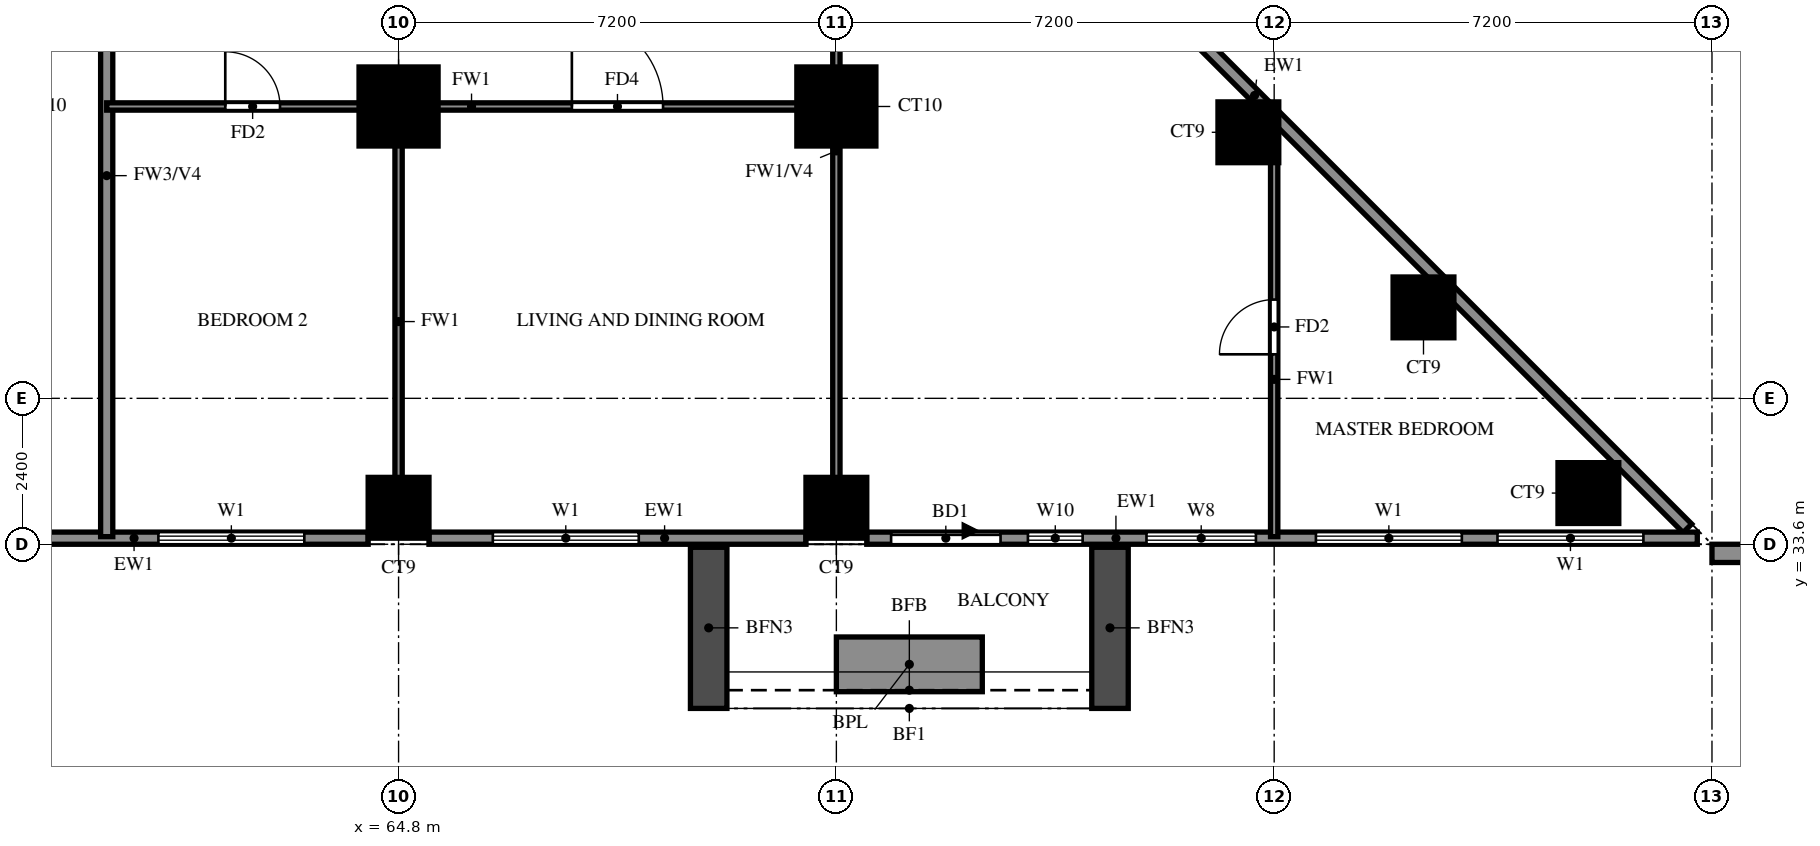
"""IFC4 building model, lengths in metres.
Left out: names, types, materials, properties, quantities, classifications, styles, units other than length and angle.
Written with IfcOpenShell. Run it as: python <this file> out.ifc"""

import sys

from ifc_helpers import new_model, si_unit, direction, frame, frame_2d, origin, origin_2d, place, context, subcontext, project, spatial, rectangle, extrude, source, transform, mapped, element, fill, save


model = new_model("IFC4")
c1 = context("Model", 3, precision=1e-05, world=origin(), true_north=direction((0.0, 1.0)))
c2 = subcontext(c1, "Body", "Model", "MODEL_VIEW")
j1 = project(units=[si_unit("LENGTHUNIT", "METRE"), si_unit("PLANEANGLEUNIT", "RADIAN")], contexts=[c1])
p1 = place(None, origin())
s1 = spatial("IfcSite", under=j1, at=p1, CompositionType="ELEMENT")
p2 = place(p1, origin())
s2 = spatial("IfcBuilding", under=s1, at=p2, CompositionType="ELEMENT")
p3 = place(p2, frame((0.0, 0.0, 86.5)))
s3 = spatial("IfcBuildingStorey", under=s2, at=p3, CompositionType="ELEMENT", Elevation=86.5)
m1 = source(origin(), c2, "Body", "SweptSolid", [
    extrude(rectangle(XDim=1.0, YDim=1.0, at=origin_2d()), origin(), (0.0, 0.0, 1.0), 3.18),
])
for number, where, z_axis, x_axis in (
    (1, (64.8, 34.2, 0.0), (0.0, 0.0, 1.0), (1.0, 0.0, 0.0)),
    (2, (72.0, 34.2, 0.0), (0.0, 0.0, 1.0), (1.0, 0.0, 0.0)),
    (3, (84.367, 34.442, 0.0), (0.0, 0.0, 1.0), (1.0, 0.0, 0.0)),
    (4, (81.656, 37.496, 0.0), (0.0, 0.0, 1.0), (1.0, 0.0, 0.0)),
    (5, (78.776, 40.376, 0.0), (0.0, 0.0, 1.0), (1.0, 0.0, 0.0)),
):
    element("IfcColumn", number, at=place(p3, frame(where, z_axis=z_axis, x_axis=x_axis)), inside=s3, PredefinedType="COLUMN", context=c2, shape_type="MappedRepresentation", body=[
        mapped(m1, transform((0.0, 0.0, 0.0))),
    ])
m2 = source(origin(), c2, "Body", "SweptSolid", [
    extrude(rectangle(XDim=1.3, YDim=1.3, at=origin_2d()), origin(), (0.0, 0.0, 1.0), 3.18),
])
for number, where, z_axis, x_axis in (
    (6, (64.8, 40.8, 0.0), (0.0, 0.0, 1.0), (1.0, 0.0, 0.0)),
    (7, (72.0, 40.8, 0.0), (0.0, 0.0, 1.0), (1.0, 0.0, 0.0)),
):
    element("IfcColumn", number, at=place(p3, frame(where, z_axis=z_axis, x_axis=x_axis)), inside=s3, PredefinedType="COLUMN", context=c2, shape_type="MappedRepresentation", body=[
        mapped(m2, transform((0.0, 0.0, 0.0))),
    ])
p4 = place(p3, frame((85.996, 33.863, 0.0), z_axis=(0.0, 0.0, 1.0), x_axis=(-0.707100718496, 0.707112843825, 0.0)))
e8 = element("IfcWall", 8, at=p4, inside=s3, PredefinedType="SOLIDWALL", context=c2, shape_type="SweptSolid", body=[
    extrude(rectangle(XDim=20.135, YDim=0.2, at=frame_2d((10.067, 0.0))), origin(), (0.0, 0.0, 1.0), 3.18),
])
p5 = place(p3, frame((58.8, 33.7, 0.0), z_axis=(0.0, 0.0, 1.0), x_axis=(1.0, 0.0, 0.0)))
e9 = element("IfcWall", 9, at=p5, inside=s3, PredefinedType="SOLIDWALL", context=c2, shape_type="SweptSolid", body=[
    extrude(rectangle(XDim=5.5, YDim=0.2, at=frame_2d((2.75, 0.0))), origin(), (0.0, 0.0, 1.0), 3.18),
])
p6 = place(p5, frame((2.05, 0.0, 0.6)))
e10 = element("IfcOpeningElement", 10, at=p6, cuts=e9, PredefinedType="OPENING", context=c2, shape_type="SweptSolid", body=[
    extrude(rectangle(XDim=2.4, YDim=2.4, at=frame_2d((1.2, 1.2))), frame((0.0, 0.11, 0.0), z_axis=(0.0, -1.0, 0.0), x_axis=(1.0, 0.0, 0.0)), (0.0, 0.0, 1.0), 0.22),
])
p7 = place(p3, frame((65.3, 33.7, 0.0), z_axis=(0.0, 0.0, 1.0), x_axis=(1.0, 0.0, 0.0)))
e11 = element("IfcWall", 11, at=p7, inside=s3, PredefinedType="SOLIDWALL", context=c2, shape_type="SweptSolid", body=[
    extrude(rectangle(XDim=6.2, YDim=0.2, at=frame_2d((3.1, 0.0))), origin(), (0.0, 0.0, 1.0), 3.18),
])
p8 = place(p7, frame((1.05, 0.0, 0.6)))
e12 = element("IfcOpeningElement", 12, at=p8, cuts=e11, PredefinedType="OPENING", context=c2, shape_type="SweptSolid", body=[
    extrude(rectangle(XDim=2.4, YDim=2.4, at=frame_2d((1.2, 1.2))), frame((0.0, 0.11, 0.0), z_axis=(0.0, -1.0, 0.0), x_axis=(1.0, 0.0, 0.0)), (0.0, 0.0, 1.0), 0.22),
])
p9 = place(p3, frame((72.5, 33.7, 0.0), z_axis=(0.0, 0.0, 1.0), x_axis=(1.0, 0.0, 0.0)))
e13 = element("IfcWall", 13, at=p9, inside=s3, PredefinedType="SOLIDWALL", context=c2, shape_type="SweptSolid", body=[
    extrude(rectangle(XDim=13.659, YDim=0.2, at=frame_2d((6.829, 0.0))), origin(), (0.0, 0.0, 1.0), 3.18),
])
p10 = place(p9, frame((0.4, 0.0, 0.0)))
e14 = element("IfcOpeningElement", 14, at=p10, cuts=e13, PredefinedType="OPENING", context=c2, shape_type="SweptSolid", body=[
    extrude(rectangle(XDim=1.8, YDim=2.4, at=frame_2d((0.9, 1.2))), frame((0.0, 0.11, 0.0), z_axis=(0.0, -1.0, 0.0), x_axis=(1.0, 0.0, 0.0)), (0.0, 0.0, 1.0), 0.22),
])
p11 = place(p9, frame((2.65, 0.0, 0.6)))
e15 = element("IfcOpeningElement", 15, at=p11, cuts=e13, PredefinedType="OPENING", context=c2, shape_type="SweptSolid", body=[
    extrude(rectangle(XDim=0.9, YDim=2.4, at=frame_2d((0.45, 1.2))), frame((0.0, 0.11, 0.0), z_axis=(0.0, -1.0, 0.0), x_axis=(1.0, 0.0, 0.0)), (0.0, 0.0, 1.0), 0.22),
])
p12 = place(p9, frame((4.6, 0.0, 0.6)))
e16 = element("IfcOpeningElement", 16, at=p12, cuts=e13, PredefinedType="OPENING", context=c2, shape_type="SweptSolid", body=[
    extrude(rectangle(XDim=1.8, YDim=2.4, at=frame_2d((0.9, 1.2))), frame((0.0, 0.11, 0.0), z_axis=(0.0, -1.0, 0.0), x_axis=(1.0, 0.0, 0.0)), (0.0, 0.0, 1.0), 0.22),
])
p13 = place(p9, frame((7.386, 0.0, 0.6)))
e17 = element("IfcOpeningElement", 17, at=p13, cuts=e13, PredefinedType="OPENING", context=c2, shape_type="SweptSolid", body=[
    extrude(rectangle(XDim=2.4, YDim=2.4, at=frame_2d((1.2, 1.2))), frame((0.0, 0.11, 0.0), z_axis=(0.0, -1.0, 0.0), x_axis=(1.0, 0.0, 0.0)), (0.0, 0.0, 1.0), 0.22),
])
p14 = place(p9, frame((10.372, 0.0, 0.6)))
e18 = element("IfcOpeningElement", 18, at=p14, cuts=e13, PredefinedType="OPENING", context=c2, shape_type="SweptSolid", body=[
    extrude(rectangle(XDim=2.4, YDim=2.4, at=frame_2d((1.2, 1.2))), frame((0.0, 0.11, 0.0), z_axis=(0.0, -1.0, 0.0), x_axis=(1.0, 0.0, 0.0)), (0.0, 0.0, 1.0), 0.22),
])
p15 = place(p3, frame((86.4, 33.45, -0.32), z_axis=(0.0, 0.0, 1.0), x_axis=(1.0, 0.0, 0.0)))
e19 = element("IfcWall", 19, at=p15, inside=s3, PredefinedType="SOLIDWALL", context=c2, shape_type="SweptSolid", body=[
    extrude(rectangle(XDim=2.4, YDim=0.3, at=frame_2d((1.2, 0.0))), origin(), (0.0, 0.0, 1.0), 3.5),
])
for number, where, z_axis, x_axis in (
    (20, (69.9, 33.55, 0.0), (0.0, 0.0, 1.0), (0.0, -1.0, 0.0)),
    (21, (76.5, 33.55, 0.0), (0.0, 0.0, 1.0), (0.0, -1.0, 0.0)),
):
    element("IfcWall", number, at=place(p3, frame(where, z_axis=z_axis, x_axis=x_axis)), inside=s3, PredefinedType="SOLIDWALL", context=c2, shape_type="SweptSolid", body=[
        extrude(rectangle(XDim=2.65, YDim=0.6, at=frame_2d((1.325, 0.0))), origin(), (0.0, 0.0, 1.0), 2.85),
    ])
p16 = place(p3, frame((72.0, 31.625, 0.0), z_axis=(0.0, 0.0, 1.0), x_axis=(1.0, 0.0, 0.0)))
e22 = element("IfcWall", 22, at=p16, inside=s3, PredefinedType="SOLIDWALL", context=c2, shape_type="SweptSolid", body=[
    extrude(rectangle(XDim=2.4, YDim=0.9, at=frame_2d((1.2, 0.0))), origin(), (0.0, 0.0, 1.0), 0.9),
])
p17 = place(p3, frame((60.0, 33.725, 0.0), z_axis=(0.0, 0.0, 1.0), x_axis=(0.0, 1.0, 0.0)))
e23 = element("IfcWall", 23, at=p17, inside=s3, PredefinedType="SOLIDWALL", context=c2, shape_type="SweptSolid", body=[
    extrude(rectangle(XDim=11.875, YDim=0.2, at=frame_2d((5.938, 0.0))), origin(), (0.0, 0.0, 1.0), 2.28),
])
p18 = place(p3, frame((60.0, 40.8, 0.0), z_axis=(0.0, 0.0, 1.0), x_axis=(1.0, 0.0, 0.0)))
e24 = element("IfcWall", 24, at=p18, inside=s3, PredefinedType="PARTITIONING", context=c2, shape_type="SweptSolid", body=[
    extrude(rectangle(XDim=12.0, YDim=0.12, at=frame_2d((6.0, 0.0))), origin(), (0.0, 0.0, 1.0), 3.18),
])
p19 = place(p18, frame((7.65, 0.0, 0.0)))
e25 = element("IfcOpeningElement", 25, at=p19, cuts=e24, PredefinedType="OPENING", context=c2, shape_type="SweptSolid", body=[
    extrude(rectangle(XDim=1.5, YDim=2.1, at=frame_2d((0.75, 1.05))), frame((0.0, 0.07, 0.0), z_axis=(0.0, -1.0, 0.0), x_axis=(1.0, 0.0, 0.0)), (0.0, 0.0, 1.0), 0.14),
])
p20 = place(p18, frame((1.95, 0.0, 0.0)))
e26 = element("IfcOpeningElement", 26, at=p20, cuts=e24, PredefinedType="OPENING", context=c2, shape_type="SweptSolid", body=[
    extrude(rectangle(XDim=0.9, YDim=2.1, at=frame_2d((0.45, 1.05))), frame((0.0, 0.07, 0.0), z_axis=(0.0, -1.0, 0.0), x_axis=(1.0, 0.0, 0.0)), (0.0, 0.0, 1.0), 0.14),
])
p21 = place(p3, frame((64.8, 33.725, 0.0), z_axis=(0.0, 0.0, 1.0), x_axis=(0.0, 1.0, 0.0)))
e27 = element("IfcWall", 27, at=p21, inside=s3, PredefinedType="PARTITIONING", context=c2, shape_type="SweptSolid", body=[
    extrude(rectangle(XDim=7.075, YDim=0.12, at=frame_2d((3.538, 0.0))), origin(), (0.0, 0.0, 1.0), 3.18),
])
p22 = place(p3, frame((72.0, 33.725, 0.0), z_axis=(0.0, 0.0, 1.0), x_axis=(0.0, 1.0, 0.0)))
e28 = element("IfcWall", 28, at=p22, inside=s3, PredefinedType="PARTITIONING", context=c2, shape_type="SweptSolid", body=[
    extrude(rectangle(XDim=14.098, YDim=0.12, at=frame_2d((7.049, 0.0))), origin(), (0.0, 0.0, 1.0), 2.28),
])
p23 = place(p22, frame((10.075, 0.0, 0.0)))
e29 = element("IfcOpeningElement", 29, at=p23, cuts=e28, PredefinedType="OPENING", context=c2, shape_type="SweptSolid", body=[
    extrude(rectangle(XDim=0.9, YDim=2.1, at=frame_2d((0.45, 1.05))), frame((0.0, 0.07, 0.0), z_axis=(0.0, -1.0, 0.0), x_axis=(1.0, 0.0, 0.0)), (0.0, 0.0, 1.0), 0.14),
])
p24 = place(p3, frame((79.2, 33.725, 0.0), z_axis=(0.0, 0.0, 1.0), x_axis=(0.0, 1.0, 0.0)))
e30 = element("IfcWall", 30, at=p24, inside=s3, PredefinedType="PARTITIONING", context=c2, shape_type="SweptSolid", body=[
    extrude(rectangle(XDim=6.898, YDim=0.12, at=frame_2d((3.449, 0.0))), origin(), (0.0, 0.0, 1.0), 3.18),
])
p25 = place(p24, frame((2.999, 0.0, 0.0)))
e31 = element("IfcOpeningElement", 31, at=p25, cuts=e30, PredefinedType="OPENING", context=c2, shape_type="SweptSolid", body=[
    extrude(rectangle(XDim=0.9, YDim=2.1, at=frame_2d((0.45, 1.05))), frame((0.0, 0.07, 0.0), z_axis=(0.0, -1.0, 0.0), x_axis=(1.0, 0.0, 0.0)), (0.0, 0.0, 1.0), 0.14),
])
p26 = place(p6, origin())
e32 = element("IfcWindow", 32, at=p26, inside=s3, PartitioningType="DOUBLE_PANEL_VERTICAL", PredefinedType="WINDOW", context=c2, shape_type="SweptSolid", body=[
    extrude(rectangle(XDim=2.4, YDim=2.4, at=frame_2d((1.2, 1.2))), frame((0.0, 0.03, 0.0), z_axis=(0.0, -1.0, 0.0), x_axis=(1.0, 0.0, 0.0)), (0.0, 0.0, 1.0), 0.06),
])
fill(e10, e32)
p27 = place(p8, origin())
e33 = element("IfcWindow", 33, at=p27, inside=s3, PartitioningType="DOUBLE_PANEL_VERTICAL", PredefinedType="WINDOW", context=c2, shape_type="SweptSolid", body=[
    extrude(rectangle(XDim=2.4, YDim=2.4, at=frame_2d((1.2, 1.2))), frame((0.0, 0.03, 0.0), z_axis=(0.0, -1.0, 0.0), x_axis=(1.0, 0.0, 0.0)), (0.0, 0.0, 1.0), 0.06),
])
fill(e12, e33)
p28 = place(p10, origin())
e34 = element("IfcDoor", 34, at=p28, inside=s3, OperationType="DOUBLE_DOOR_SLIDING", PredefinedType="DOOR", context=c2, shape_type="SweptSolid", body=[
    extrude(rectangle(XDim=1.8, YDim=2.4, at=frame_2d((0.9, 1.2))), frame((0.0, 0.025, 0.0), z_axis=(0.0, -1.0, 0.0), x_axis=(1.0, 0.0, 0.0)), (0.0, 0.0, 1.0), 0.05),
])
fill(e14, e34)
p29 = place(p11, origin())
e35 = element("IfcWindow", 35, at=p29, inside=s3, PartitioningType="SINGLE_PANEL", PredefinedType="WINDOW", context=c2, shape_type="SweptSolid", body=[
    extrude(rectangle(XDim=0.9, YDim=2.4, at=frame_2d((0.45, 1.2))), frame((0.0, 0.03, 0.0), z_axis=(0.0, -1.0, 0.0), x_axis=(1.0, 0.0, 0.0)), (0.0, 0.0, 1.0), 0.06),
])
fill(e15, e35)
p30 = place(p12, origin())
e36 = element("IfcWindow", 36, at=p30, inside=s3, PartitioningType="DOUBLE_PANEL_VERTICAL", PredefinedType="WINDOW", context=c2, shape_type="SweptSolid", body=[
    extrude(rectangle(XDim=1.8, YDim=2.4, at=frame_2d((0.9, 1.2))), frame((0.0, 0.03, 0.0), z_axis=(0.0, -1.0, 0.0), x_axis=(1.0, 0.0, 0.0)), (0.0, 0.0, 1.0), 0.06),
])
fill(e16, e36)
p31 = place(p13, origin())
e37 = element("IfcWindow", 37, at=p31, inside=s3, PartitioningType="DOUBLE_PANEL_VERTICAL", PredefinedType="WINDOW", context=c2, shape_type="SweptSolid", body=[
    extrude(rectangle(XDim=2.4, YDim=2.4, at=frame_2d((1.2, 1.2))), frame((0.0, 0.03, 0.0), z_axis=(0.0, -1.0, 0.0), x_axis=(1.0, 0.0, 0.0)), (0.0, 0.0, 1.0), 0.06),
])
fill(e17, e37)
p32 = place(p14, origin())
e38 = element("IfcWindow", 38, at=p32, inside=s3, PartitioningType="DOUBLE_PANEL_VERTICAL", PredefinedType="WINDOW", context=c2, shape_type="SweptSolid", body=[
    extrude(rectangle(XDim=2.4, YDim=2.4, at=frame_2d((1.2, 1.2))), frame((0.0, 0.03, 0.0), z_axis=(0.0, -1.0, 0.0), x_axis=(1.0, 0.0, 0.0)), (0.0, 0.0, 1.0), 0.06),
])
fill(e18, e38)
p33 = place(p19, origin())
e39 = element("IfcDoor", 39, at=p33, inside=s3, OperationType="SINGLE_SWING_LEFT", PredefinedType="DOOR", context=c2, shape_type="SweptSolid", body=[
    extrude(rectangle(XDim=1.5, YDim=2.1, at=frame_2d((0.75, 1.05))), frame((0.0, 0.025, 0.0), z_axis=(0.0, -1.0, 0.0), x_axis=(1.0, 0.0, 0.0)), (0.0, 0.0, 1.0), 0.05),
])
fill(e25, e39)
p34 = place(p20, origin())
e40 = element("IfcDoor", 40, at=p34, inside=s3, OperationType="SINGLE_SWING_RIGHT", PredefinedType="DOOR", context=c2, shape_type="SweptSolid", body=[
    extrude(rectangle(XDim=0.9, YDim=2.1, at=frame_2d((0.45, 1.05))), frame((0.0, 0.025, 0.0), z_axis=(0.0, -1.0, 0.0), x_axis=(1.0, 0.0, 0.0)), (0.0, 0.0, 1.0), 0.05),
])
fill(e26, e40)
p35 = place(p25, origin())
e41 = element("IfcDoor", 41, at=p35, inside=s3, OperationType="SINGLE_SWING_LEFT", PredefinedType="DOOR", context=c2, shape_type="SweptSolid", body=[
    extrude(rectangle(XDim=0.9, YDim=2.1, at=frame_2d((0.45, 1.05))), frame((0.0, 0.025, 0.0), z_axis=(0.0, -1.0, 0.0), x_axis=(1.0, 0.0, 0.0)), (0.0, 0.0, 1.0), 0.05),
])
fill(e31, e41)
save(model, sys.argv[1])
